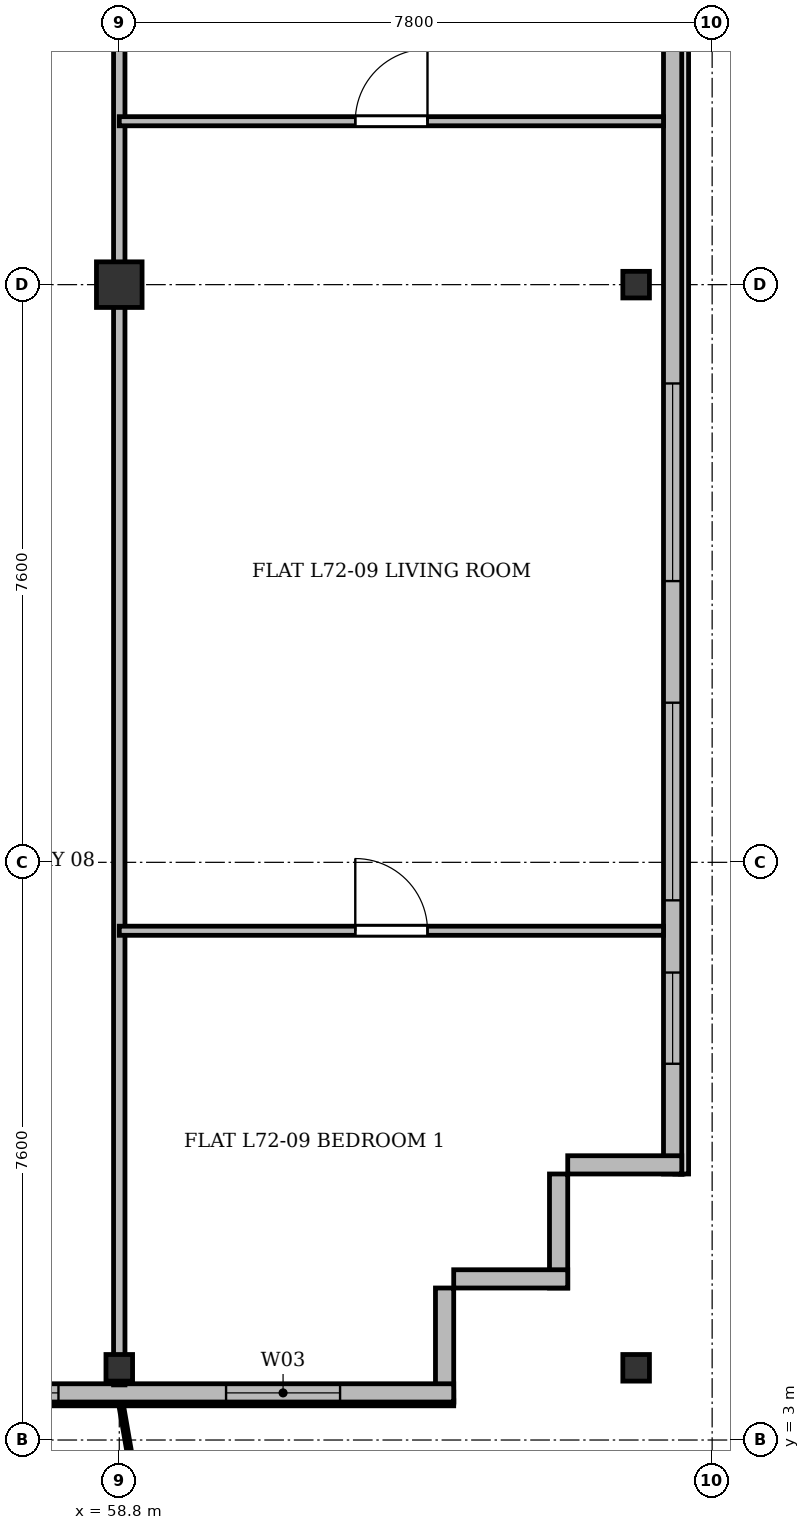
"""IFC4 building model, lengths in metres.
Left out: names, types, materials, properties, quantities, classifications, styles, units other than length and angle.
Written with IfcOpenShell. Run it as: python <this file> out.ifc"""

import sys

from ifc_helpers import new_model, si_unit, direction, frame, frame_2d, origin, origin_2d, place, context, subcontext, project, spatial, rectangle, i_section, extrude, source, transform, mapped, element, fill, save


model = new_model("IFC4")
c1 = context("Model", 3, precision=1e-05, world=origin(), true_north=direction((0.0, 1.0)))
c2 = subcontext(c1, "Body", "Model", "MODEL_VIEW")
j1 = project(units=[si_unit("LENGTHUNIT", "METRE"), si_unit("PLANEANGLEUNIT", "RADIAN")], contexts=[c1])
p1 = place(None, origin())
s1 = spatial("IfcSite", under=j1, at=p1, CompositionType="ELEMENT")
p2 = place(p1, origin())
s2 = spatial("IfcBuilding", under=s1, at=p2, CompositionType="ELEMENT")
p3 = place(p2, frame((0.0, 0.0, 277.5)))
s3 = spatial("IfcBuildingStorey", under=s2, at=p3, CompositionType="ELEMENT", Elevation=277.5)
m1 = source(origin(), c2, "Body", "SweptSolid", [
    extrude(i_section(OverallWidth=0.35, OverallDepth=0.35, WebThickness=0.018, FlangeThickness=0.028, at=origin_2d()), origin(), (0.0, 0.0, 1.0), 3.6),
])
p4 = place(p3, frame((58.8, 3.95, 0.0), z_axis=(0.0, 0.0, 1.0), x_axis=(1.0, 0.0, 0.0)))
e1 = element("IfcColumn", 1, at=p4, inside=s3, PredefinedType="COLUMN", context=c2, shape_type="MappedRepresentation", body=[
    mapped(m1, transform((0.0, 0.0, 0.0), x_axis=(1.0, 0.0, 0.0), y_axis=(0.0, 1.0, 0.0), z_axis=(0.0, 0.0, 1.0), scale=1.0)),
])
m2 = source(origin(), c2, "Body", "SweptSolid", [
    extrude(rectangle(XDim=0.6, YDim=0.6, at=origin_2d()), origin(), (0.0, 0.0, 1.0), 3.6),
])
p5 = place(p3, frame((58.8, 18.2, 0.0), z_axis=(0.0, 0.0, 1.0), x_axis=(1.0, 0.0, 0.0)))
e2 = element("IfcColumn", 2, at=p5, inside=s3, PredefinedType="COLUMN", context=c2, shape_type="MappedRepresentation", body=[
    mapped(m2, transform((0.0, 0.0, 0.0), x_axis=(1.0, 0.0, 0.0), y_axis=(0.0, 1.0, 0.0), z_axis=(0.0, 0.0, 1.0), scale=1.0)),
])
for number, where, z_axis, x_axis in (
    (3, (65.6, 3.95, 0.0), (0.0, 0.0, 1.0), (1.0, 0.0, 0.0)),
    (4, (65.6, 18.2, 0.0), (0.0, 0.0, 1.0), (1.0, 0.0, 0.0)),
):
    element("IfcColumn", number, at=place(p3, frame(where, z_axis=z_axis, x_axis=x_axis)), inside=s3, PredefinedType="COLUMN", context=c2, shape_type="MappedRepresentation", body=[
        mapped(m1, transform((0.0, 0.0, 0.0), x_axis=(1.0, 0.0, 0.0), y_axis=(0.0, 1.0, 0.0), z_axis=(0.0, 0.0, 1.0), scale=1.0)),
    ])
p6 = place(p3, frame((66.08, 45.5, 0.0), z_axis=(0.0, 0.0, 1.0), x_axis=(0.0, -1.0, 0.0)))
e5 = element("IfcWall", 5, at=p6, inside=s3, PredefinedType="SOLIDWALL", context=c2, shape_type="SweptSolid", body=[
    extrude(rectangle(XDim=39.0, YDim=0.24, at=frame_2d((19.5, 0.0))), origin(), (0.0, 0.0, 1.0), 3.37),
])
p7 = place(p6, frame((36.35, 0.0, 0.92)))
e6 = element("IfcOpeningElement", 6, at=p7, cuts=e5, PredefinedType="OPENING", context=c2, shape_type="SweptSolid", body=[
    extrude(rectangle(XDim=1.2, YDim=1.65, at=frame_2d((0.6, 0.825))), frame((0.0, 0.13, 0.0), z_axis=(0.0, -1.0, 0.0), x_axis=(1.0, 0.0, 0.0)), (0.0, 0.0, 1.0), 0.26),
])
p8 = place(p6, frame((32.8, 0.0, 0.92)))
e7 = element("IfcOpeningElement", 7, at=p8, cuts=e5, PredefinedType="OPENING", context=c2, shape_type="SweptSolid", body=[
    extrude(rectangle(XDim=2.6, YDim=1.9, at=frame_2d((1.3, 0.95))), frame((0.0, 0.13, 0.0), z_axis=(0.0, -1.0, 0.0), x_axis=(1.0, 0.0, 0.0)), (0.0, 0.0, 1.0), 0.26),
])
p9 = place(p6, frame((28.6, 0.0, 0.92)))
e8 = element("IfcOpeningElement", 8, at=p9, cuts=e5, PredefinedType="OPENING", context=c2, shape_type="SweptSolid", body=[
    extrude(rectangle(XDim=2.6, YDim=1.9, at=frame_2d((1.3, 0.95))), frame((0.0, 0.13, 0.0), z_axis=(0.0, -1.0, 0.0), x_axis=(1.0, 0.0, 0.0)), (0.0, 0.0, 1.0), 0.26),
])
p10 = place(p6, frame((21.4, 0.0, 0.92)))
e9 = element("IfcOpeningElement", 9, at=p10, cuts=e5, PredefinedType="OPENING", context=c2, shape_type="SweptSolid", body=[
    extrude(rectangle(XDim=2.6, YDim=1.9, at=frame_2d((1.3, 0.95))), frame((0.0, 0.13, 0.0), z_axis=(0.0, -1.0, 0.0), x_axis=(1.0, 0.0, 0.0)), (0.0, 0.0, 1.0), 0.26),
])
p11 = place(p6, frame((7.4, 0.0, 0.92)))
e10 = element("IfcOpeningElement", 10, at=p11, cuts=e5, PredefinedType="OPENING", context=c2, shape_type="SweptSolid", body=[
    extrude(rectangle(XDim=2.6, YDim=1.9, at=frame_2d((1.3, 0.95))), frame((0.0, 0.13, 0.0), z_axis=(0.0, -1.0, 0.0), x_axis=(1.0, 0.0, 0.0)), (0.0, 0.0, 1.0), 0.26),
])
p12 = place(p6, frame((4.5, 0.0, 0.92)))
e11 = element("IfcOpeningElement", 11, at=p12, cuts=e5, PredefinedType="OPENING", context=c2, shape_type="SweptSolid", body=[
    extrude(rectangle(XDim=1.2, YDim=1.65, at=frame_2d((0.6, 0.825))), frame((0.0, 0.13, 0.0), z_axis=(0.0, -1.0, 0.0), x_axis=(1.0, 0.0, 0.0)), (0.0, 0.0, 1.0), 0.26),
])
p13 = place(p6, frame((1.15, 0.0, 0.92)))
e12 = element("IfcOpeningElement", 12, at=p13, cuts=e5, PredefinedType="OPENING", context=c2, shape_type="SweptSolid", body=[
    extrude(rectangle(XDim=1.2, YDim=1.65, at=frame_2d((0.6, 0.825))), frame((0.0, 0.13, 0.0), z_axis=(0.0, -1.0, 0.0), x_axis=(1.0, 0.0, 0.0)), (0.0, 0.0, 1.0), 0.26),
])
p14 = place(p3, frame((66.2, 6.62, 0.0), z_axis=(0.0, 0.0, 1.0), x_axis=(-1.0, 0.0, 0.0)))
e13 = element("IfcWall", 13, at=p14, inside=s3, PredefinedType="SOLIDWALL", context=c2, shape_type="SweptSolid", body=[
    extrude(rectangle(XDim=1.5, YDim=0.24, at=frame_2d((0.75, 0.0))), origin(), (0.0, 0.0, 1.0), 2.87),
])
for number, where, z_axis, x_axis in (
    (14, (64.58, 6.5, 0.0), (0.0, 0.0, 1.0), (0.0, -1.0, 0.0)),
    (15, (64.7, 5.12, 0.0), (0.0, 0.0, 1.0), (-1.0, 0.0, 0.0)),
):
    element("IfcWall", number, at=place(p3, frame(where, z_axis=z_axis, x_axis=x_axis)), inside=s3, PredefinedType="SOLIDWALL", context=c2, shape_type="SweptSolid", body=[
        extrude(rectangle(XDim=1.5, YDim=0.24, at=frame_2d((0.75, 0.0))), origin(), (0.0, 0.0, 1.0), 3.37),
    ])
p15 = place(p3, frame((63.08, 5.0, 0.0), z_axis=(0.0, 0.0, 1.0), x_axis=(0.0, -1.0, 0.0)))
e16 = element("IfcWall", 16, at=p15, inside=s3, PredefinedType="SOLIDWALL", context=c2, shape_type="SweptSolid", body=[
    extrude(rectangle(XDim=1.5, YDim=0.24, at=frame_2d((0.75, 0.0))), origin(), (0.0, 0.0, 1.0), 2.92),
])
p16 = place(p3, frame((63.2, 3.62, 0.0), z_axis=(0.0, 0.0, 1.0), x_axis=(-1.0, 0.0, 0.0)))
e17 = element("IfcWall", 17, at=p16, inside=s3, PredefinedType="SOLIDWALL", context=c2, shape_type="SweptSolid", body=[
    extrude(rectangle(XDim=52.0, YDim=0.24, at=frame_2d((26.0, 0.0))), origin(), (0.0, 0.0, 1.0), 3.37),
])
p17 = place(p16, frame((1.495, 0.0, 0.9)))
e18 = element("IfcOpeningElement", 18, at=p17, cuts=e17, PredefinedType="OPENING", context=c2, shape_type="SweptSolid", body=[
    extrude(rectangle(XDim=1.5, YDim=1.75, at=frame_2d((0.75, 0.875))), frame((0.0, 0.13, 0.0), z_axis=(0.0, -1.0, 0.0), x_axis=(1.0, 0.0, 0.0)), (0.0, 0.0, 1.0), 0.26),
])
p18 = place(p16, frame((5.2, 0.0, 0.9)))
e19 = element("IfcOpeningElement", 19, at=p18, cuts=e17, PredefinedType="OPENING", context=c2, shape_type="SweptSolid", body=[
    extrude(rectangle(XDim=2.0, YDim=1.95, at=frame_2d((1.0, 0.975))), frame((0.0, 0.13, 0.0), z_axis=(0.0, -1.0, 0.0), x_axis=(1.0, 0.0, 0.0)), (0.0, 0.0, 1.0), 0.26),
])
p19 = place(p16, frame((9.275, 0.0, 0.9)))
e20 = element("IfcOpeningElement", 20, at=p19, cuts=e17, PredefinedType="OPENING", context=c2, shape_type="SweptSolid", body=[
    extrude(rectangle(XDim=1.65, YDim=1.85, at=frame_2d((0.825, 0.925))), frame((0.0, 0.13, 0.0), z_axis=(0.0, -1.0, 0.0), x_axis=(1.0, 0.0, 0.0)), (0.0, 0.0, 1.0), 0.26),
])
p20 = place(p16, frame((14.017, 0.0, 0.0)))
e21 = element("IfcOpeningElement", 21, at=p20, cuts=e17, PredefinedType="OPENING", context=c2, shape_type="SweptSolid", body=[
    extrude(rectangle(XDim=1.2, YDim=2.2, at=frame_2d((0.6, 1.1))), frame((0.0, 0.13, 0.0), z_axis=(0.0, -1.0, 0.0), x_axis=(1.0, 0.0, 0.0)), (0.0, 0.0, 1.0), 0.26),
])
p21 = place(p16, frame((24.9, 0.0, 0.9)))
e22 = element("IfcOpeningElement", 22, at=p21, cuts=e17, PredefinedType="OPENING", context=c2, shape_type="SweptSolid", body=[
    extrude(rectangle(XDim=2.2, YDim=1.8, at=frame_2d((1.1, 0.9))), frame((0.0, 0.13, 0.0), z_axis=(0.0, -1.0, 0.0), x_axis=(1.0, 0.0, 0.0)), (0.0, 0.0, 1.0), 0.26),
])
p22 = place(p16, frame((33.05, 0.0, 0.9)))
e23 = element("IfcOpeningElement", 23, at=p22, cuts=e17, PredefinedType="OPENING", context=c2, shape_type="SweptSolid", body=[
    extrude(rectangle(XDim=1.5, YDim=1.75, at=frame_2d((0.75, 0.875))), frame((0.0, 0.13, 0.0), z_axis=(0.0, -1.0, 0.0), x_axis=(1.0, 0.0, 0.0)), (0.0, 0.0, 1.0), 0.26),
])
p23 = place(p16, frame((35.45, 0.0, 0.9)))
e24 = element("IfcOpeningElement", 24, at=p23, cuts=e17, PredefinedType="OPENING", context=c2, shape_type="SweptSolid", body=[
    extrude(rectangle(XDim=1.5, YDim=1.75, at=frame_2d((0.75, 0.875))), frame((0.0, 0.13, 0.0), z_axis=(0.0, -1.0, 0.0), x_axis=(1.0, 0.0, 0.0)), (0.0, 0.0, 1.0), 0.26),
])
p24 = place(p16, frame((37.775, 0.0, 0.9)))
e25 = element("IfcOpeningElement", 25, at=p24, cuts=e17, PredefinedType="OPENING", context=c2, shape_type="SweptSolid", body=[
    extrude(rectangle(XDim=1.65, YDim=1.85, at=frame_2d((0.825, 0.925))), frame((0.0, 0.13, 0.0), z_axis=(0.0, -1.0, 0.0), x_axis=(1.0, 0.0, 0.0)), (0.0, 0.0, 1.0), 0.26),
])
p25 = place(p16, frame((41.452, 0.0, 0.0)))
e26 = element("IfcOpeningElement", 26, at=p25, cuts=e17, PredefinedType="OPENING", context=c2, shape_type="SweptSolid", body=[
    extrude(rectangle(XDim=1.2, YDim=2.2, at=frame_2d((0.6, 1.1))), frame((0.0, 0.13, 0.0), z_axis=(0.0, -1.0, 0.0), x_axis=(1.0, 0.0, 0.0)), (0.0, 0.0, 1.0), 0.26),
])
p26 = place(p16, frame((44.3, 0.0, 0.9)))
e27 = element("IfcOpeningElement", 27, at=p26, cuts=e17, PredefinedType="OPENING", context=c2, shape_type="SweptSolid", body=[
    extrude(rectangle(XDim=2.2, YDim=1.8, at=frame_2d((1.1, 0.9))), frame((0.0, 0.13, 0.0), z_axis=(0.0, -1.0, 0.0), x_axis=(1.0, 0.0, 0.0)), (0.0, 0.0, 1.0), 0.26),
])
p27 = place(p16, frame((49.005, 0.0, 0.9)))
e28 = element("IfcOpeningElement", 28, at=p27, cuts=e17, PredefinedType="OPENING", context=c2, shape_type="SweptSolid", body=[
    extrude(rectangle(XDim=1.5, YDim=1.75, at=frame_2d((0.75, 0.875))), frame((0.0, 0.13, 0.0), z_axis=(0.0, -1.0, 0.0), x_axis=(1.0, 0.0, 0.0)), (0.0, 0.0, 1.0), 0.26),
])
p28 = place(p3, frame((58.8, 3.725, 0.0), z_axis=(0.0, 0.0, 1.0), x_axis=(0.0, 1.0, 0.0)))
e29 = element("IfcWall", 29, at=p28, inside=s3, PredefinedType="PARTITIONING", context=c2, shape_type="SweptSolid", body=[
    extrude(rectangle(XDim=27.275, YDim=0.15, at=frame_2d((13.637, 0.0))), origin(), (0.0, 0.0, 1.0), 2.87),
])
p29 = place(p3, frame((58.8, 20.35, 0.0), z_axis=(0.0, 0.0, 1.0), x_axis=(1.0, 0.0, 0.0)))
e30 = element("IfcWall", 30, at=p29, inside=s3, PredefinedType="PARTITIONING", context=c2, shape_type="SweptSolid", body=[
    extrude(rectangle(XDim=7.16, YDim=0.12, at=frame_2d((3.58, 0.0))), origin(), (0.0, 0.0, 1.0), 2.87),
])
p30 = place(p29, frame((3.105, 0.0, 0.0)))
e31 = element("IfcOpeningElement", 31, at=p30, cuts=e30, PredefinedType="OPENING", context=c2, shape_type="SweptSolid", body=[
    extrude(rectangle(XDim=0.95, YDim=2.15, at=frame_2d((0.475, 1.075))), frame((0.0, 0.07, 0.0), z_axis=(0.0, -1.0, 0.0), x_axis=(1.0, 0.0, 0.0)), (0.0, 0.0, 1.0), 0.14),
])
p31 = place(p3, frame((58.8, 9.7, 0.0), z_axis=(0.0, 0.0, 1.0), x_axis=(1.0, 0.0, 0.0)))
e32 = element("IfcWall", 32, at=p31, inside=s3, PredefinedType="PARTITIONING", context=c2, shape_type="SweptSolid", body=[
    extrude(rectangle(XDim=7.16, YDim=0.12, at=frame_2d((3.58, 0.0))), origin(), (0.0, 0.0, 1.0), 2.87),
])
p32 = place(p31, frame((3.105, 0.0, 0.0)))
e33 = element("IfcOpeningElement", 33, at=p32, cuts=e32, PredefinedType="OPENING", context=c2, shape_type="SweptSolid", body=[
    extrude(rectangle(XDim=0.95, YDim=2.15, at=frame_2d((0.475, 1.075))), frame((0.0, 0.07, 0.0), z_axis=(0.0, -1.0, 0.0), x_axis=(1.0, 0.0, 0.0)), (0.0, 0.0, 1.0), 0.14),
])
m3 = source(origin(), c2, "Body", "SweptSolid", [
    extrude(rectangle(XDim=1.2, YDim=1.65, at=frame_2d((0.6, 0.825))), frame((0.0, 0.03, 0.0), z_axis=(0.0, -1.0, 0.0), x_axis=(1.0, 0.0, 0.0)), (0.0, 0.0, 1.0), 0.06),
])
p33 = place(p7, origin())
e34 = element("IfcWindow", 34, at=p33, inside=s3, PartitioningType="SINGLE_PANEL", PredefinedType="WINDOW", context=c2, shape_type="MappedRepresentation", body=[
    mapped(m3, transform((0.0, 0.0, 0.0), x_axis=(1.0, 0.0, 0.0), y_axis=(0.0, 1.0, 0.0), z_axis=(0.0, 0.0, 1.0), scale=1.0)),
])
fill(e6, e34)
m4 = source(origin(), c2, "Body", "SweptSolid", [
    extrude(rectangle(XDim=2.6, YDim=1.9, at=frame_2d((1.3, 0.95))), frame((0.0, 0.03, 0.0), z_axis=(0.0, -1.0, 0.0), x_axis=(1.0, 0.0, 0.0)), (0.0, 0.0, 1.0), 0.06),
])
p34 = place(p8, origin())
e35 = element("IfcWindow", 35, at=p34, inside=s3, PartitioningType="SINGLE_PANEL", PredefinedType="WINDOW", context=c2, shape_type="MappedRepresentation", body=[
    mapped(m4, transform((0.0, 0.0, 0.0), x_axis=(1.0, 0.0, 0.0), y_axis=(0.0, 1.0, 0.0), z_axis=(0.0, 0.0, 1.0), scale=1.0)),
])
fill(e7, e35)
p35 = place(p9, origin())
e36 = element("IfcWindow", 36, at=p35, inside=s3, PartitioningType="SINGLE_PANEL", PredefinedType="WINDOW", context=c2, shape_type="MappedRepresentation", body=[
    mapped(m4, transform((0.0, 0.0, 0.0), x_axis=(1.0, 0.0, 0.0), y_axis=(0.0, 1.0, 0.0), z_axis=(0.0, 0.0, 1.0), scale=1.0)),
])
fill(e8, e36)
m5 = source(origin(), c2, "Body", "SweptSolid", [
    extrude(rectangle(XDim=1.5, YDim=1.75, at=frame_2d((0.75, 0.875))), frame((0.0, 0.03, 0.0), z_axis=(0.0, -1.0, 0.0), x_axis=(1.0, 0.0, 0.0)), (0.0, 0.0, 1.0), 0.06),
])
p36 = place(p17, origin())
e37 = element("IfcWindow", 37, at=p36, inside=s3, PartitioningType="SINGLE_PANEL", PredefinedType="WINDOW", context=c2, shape_type="MappedRepresentation", body=[
    mapped(m5, transform((0.0, 0.0, 0.0), x_axis=(1.0, 0.0, 0.0), y_axis=(0.0, 1.0, 0.0), z_axis=(0.0, 0.0, 1.0), scale=1.0)),
])
fill(e18, e37)
m6 = source(origin(), c2, "Body", "SweptSolid", [
    extrude(rectangle(XDim=2.0, YDim=1.95, at=frame_2d((1.0, 0.975))), frame((0.0, 0.03, 0.0), z_axis=(0.0, -1.0, 0.0), x_axis=(1.0, 0.0, 0.0)), (0.0, 0.0, 1.0), 0.06),
])
p37 = place(p18, origin())
e38 = element("IfcWindow", 38, at=p37, inside=s3, PartitioningType="SINGLE_PANEL", PredefinedType="WINDOW", context=c2, shape_type="MappedRepresentation", body=[
    mapped(m6, transform((0.0, 0.0, 0.0), x_axis=(1.0, 0.0, 0.0), y_axis=(0.0, 1.0, 0.0), z_axis=(0.0, 0.0, 1.0), scale=1.0)),
])
fill(e19, e38)
m7 = source(origin(), c2, "Body", "SweptSolid", [
    extrude(rectangle(XDim=0.95, YDim=2.15, at=frame_2d((0.475, 1.075))), frame((0.0, 0.025, 0.0), z_axis=(0.0, -1.0, 0.0), x_axis=(1.0, 0.0, 0.0)), (0.0, 0.0, 1.0), 0.05),
])
p38 = place(p30, origin())
e39 = element("IfcDoor", 39, at=p38, inside=s3, OperationType="SINGLE_SWING_RIGHT", PredefinedType="DOOR", context=c2, shape_type="MappedRepresentation", body=[
    mapped(m7, transform((0.0, 0.0, 0.0), x_axis=(1.0, 0.0, 0.0), y_axis=(0.0, 1.0, 0.0), z_axis=(0.0, 0.0, 1.0), scale=1.0)),
])
fill(e31, e39)
p39 = place(p32, origin())
e40 = element("IfcDoor", 40, at=p39, inside=s3, OperationType="SINGLE_SWING_LEFT", PredefinedType="DOOR", context=c2, shape_type="MappedRepresentation", body=[
    mapped(m7, transform((0.0, 0.0, 0.0), x_axis=(1.0, 0.0, 0.0), y_axis=(0.0, 1.0, 0.0), z_axis=(0.0, 0.0, 1.0), scale=1.0)),
])
fill(e33, e40)
save(model, sys.argv[1])
